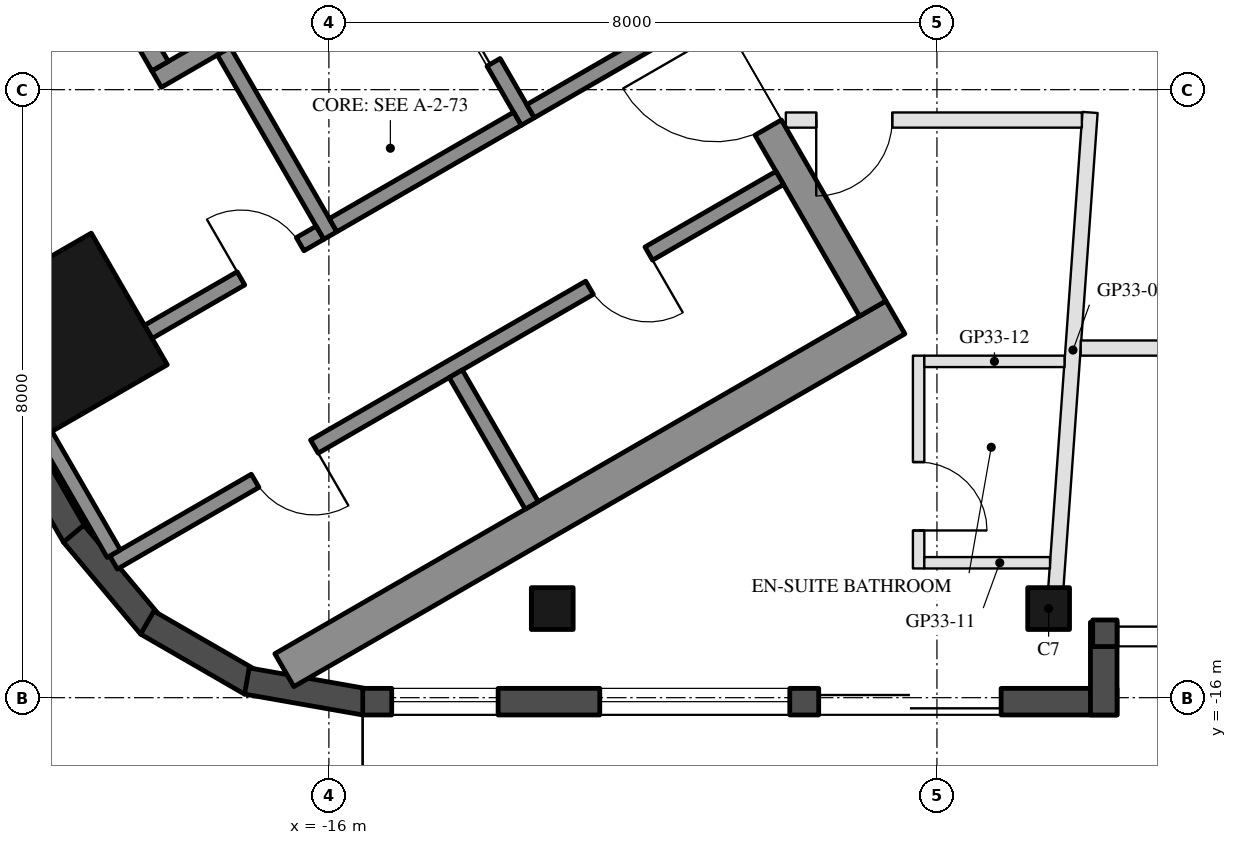
"""IFC4 building model, lengths in metres.
Left out: names, types, materials, properties, quantities, classifications, styles, units other than length and angle.
Written with IfcOpenShell. Run it as: python <this file> out.ifc"""

import sys

from ifc_helpers import new_model, si_unit, direction, frame, frame_2d, origin, origin_2d, place, context, subcontext, project, spatial, rectangle, hollow_rectangle, extrude, boolean, halfspace, element, fill, save


model = new_model("IFC4")
c1 = context("Model", 3, precision=1e-05, world=origin(), true_north=direction((0.0, 1.0)))
c2 = subcontext(c1, "Body", "Model", "MODEL_VIEW")
j1 = project(units=[si_unit("LENGTHUNIT", "METRE"), si_unit("PLANEANGLEUNIT", "RADIAN")], contexts=[c1])
p1 = place(None, origin())
s1 = spatial("IfcSite", under=j1, at=p1, CompositionType="ELEMENT")
p2 = place(p1, origin())
s2 = spatial("IfcBuilding", under=s1, at=p2, CompositionType="ELEMENT")
p3 = place(p2, frame((0.0, 0.0, 313.3)))
s3 = spatial("IfcBuildingStorey", under=s2, at=p3, CompositionType="ELEMENT", Elevation=313.3)
p4 = place(p3, frame((-13.061, -14.827, 0.0), z_axis=(0.0, 0.0, 1.0), x_axis=(-1.0, 0.0, 0.0)))
e1 = element("IfcColumn", 1, at=p4, inside=s3, PredefinedType="COLUMN", context=c2, shape_type="SweptSolid", body=[
    boolean("DIFFERENCE", extrude(hollow_rectangle(XDim=0.55, YDim=0.55, WallThickness=0.025, at=origin_2d()), origin(), (0.0, 0.0, 1.0), 3.7), halfspace(frame((0.0, 0.0, 0.04), z_axis=(0.0, 0.0, 1.0), x_axis=(1.0, 0.0, 0.0)), True)),
])
p5 = place(p3, frame((-6.531, -14.827, 0.0), z_axis=(0.0, 0.0, 1.0), x_axis=(-1.0, 0.0, 0.0)))
e2 = element("IfcColumn", 2, at=p5, inside=s3, PredefinedType="COLUMN", context=c2, shape_type="SweptSolid", body=[
    boolean("DIFFERENCE", extrude(hollow_rectangle(XDim=0.55, YDim=0.55, WallThickness=0.025, at=origin_2d()), origin(), (0.0, 0.0, 1.0), 3.7), halfspace(frame((0.0, 0.0, 0.034), z_axis=(0.0, 0.0, 1.0), x_axis=(1.0, 0.0, 0.0)), True)),
])
p6 = place(p3, frame((-19.492, -11.254, 0.0), z_axis=(0.0, 0.0, 1.0), x_axis=(-0.5, 0.866025403784, 0.0)))
e3 = element("IfcColumn", 3, at=p6, inside=s3, PredefinedType="COLUMN", context=c2, shape_type="SweptSolid", body=[
    boolean("DIFFERENCE", extrude(hollow_rectangle(XDim=2.0, YDim=2.0, WallThickness=0.05, at=origin_2d()), origin(), (0.0, 0.0, 1.0), 3.7), halfspace(frame((0.0, 0.0, 0.113), z_axis=(0.0, 0.0, 1.0), x_axis=(1.0, 0.0, 0.0)), True)),
])
p7 = place(p3, frame((-21.679, -9.816, 0.0), z_axis=(0.0, 0.0, 1.0), x_axis=(0.500023656998, -0.86601174498, 0.0)))
e4 = element("IfcWall", 4, at=p7, inside=s3, PredefinedType="SOLIDWALL", context=c2, shape_type="SweptSolid", body=[
    extrude(rectangle(XDim=4.677, YDim=0.35, at=frame_2d((2.339, 0.0))), origin(), (0.0, 0.0, 1.0), 3.55),
])
for number, where, z_axis, x_axis in (
    (5, (-19.358, -13.842, 0.0), (0.0, 0.0, 1.0), (0.643, -0.766, 0.0)),
    (6, (-18.389, -15.012, 0.0), (0.0, 0.0, 1.0), (0.866, -0.5, 0.0)),
    (7, (-17.079, -15.781, 0.0), (0.0, 0.0, 1.0), (0.985, -0.174, 0.0)),
):
    element("IfcWall", number, at=place(p3, frame(where, z_axis=z_axis, x_axis=x_axis)), inside=s3, PredefinedType="SOLIDWALL", context=c2, shape_type="SweptSolid", body=[
        extrude(rectangle(XDim=1.579, YDim=0.35, at=frame_2d((0.79, 0.0))), origin(), (0.0, 0.0, 1.0), 3.55),
    ])
p8 = place(p3, frame((-15.554, -16.052, 0.0), z_axis=(0.0, 0.0, 1.0), x_axis=(1.0, 0.0, 0.0)))
e8 = element("IfcWall", 8, at=p8, inside=s3, PredefinedType="SOLIDWALL", context=c2, shape_type="SweptSolid", body=[
    extrude(rectangle(XDim=9.924, YDim=0.35, at=frame_2d((4.962, 0.0))), origin(), (0.0, 0.0, 1.0), 3.55),
])
p9 = place(p8, frame((0.381, 0.0, 0.3)))
e9 = element("IfcOpeningElement", 9, at=p9, cuts=e8, PredefinedType="OPENING", context=c2, shape_type="SweptSolid", body=[
    extrude(rectangle(XDim=1.4, YDim=2.65, at=frame_2d((0.7, 1.325))), frame((0.0, 0.185, 0.0), z_axis=(0.0, -1.0, 0.0), x_axis=(1.0, 0.0, 0.0)), (0.0, 0.0, 1.0), 0.37),
])
p10 = place(p8, frame((5.999, 0.0, 0.0)))
e10 = element("IfcOpeningElement", 10, at=p10, cuts=e8, PredefinedType="OPENING", context=c2, shape_type="SweptSolid", body=[
    extrude(rectangle(XDim=2.4, YDim=2.4, at=frame_2d((1.2, 1.2))), frame((0.0, 0.185, 0.0), z_axis=(0.0, -1.0, 0.0), x_axis=(1.0, 0.0, 0.0)), (0.0, 0.0, 1.0), 0.37),
])
p11 = place(p8, frame((3.118, 0.0, 0.3)))
e11 = element("IfcOpeningElement", 11, at=p11, cuts=e8, PredefinedType="OPENING", context=c2, shape_type="SweptSolid", body=[
    extrude(rectangle(XDim=2.5, YDim=2.65, at=frame_2d((1.25, 1.325))), frame((0.0, 0.185, 0.0), z_axis=(0.0, -1.0, 0.0), x_axis=(1.0, 0.0, 0.0)), (0.0, 0.0, 1.0), 0.37),
])
p12 = place(p3, frame((-5.806, -16.228, 0.0), z_axis=(0.0, 0.0, 1.0), x_axis=(0.0, 1.0, 0.0)))
e12 = element("IfcWall", 12, at=p12, inside=s3, PredefinedType="SOLIDWALL", context=c2, shape_type="SweptSolid", body=[
    extrude(rectangle(XDim=1.22, YDim=0.35, at=frame_2d((0.61, 0.0))), origin(), (0.0, 0.0, 1.0), 3.55),
])
p13 = place(p3, frame((-5.951, -15.153, 0.0), z_axis=(0.0, 0.0, 1.0), x_axis=(1.0, 0.0, 0.0)))
e13 = element("IfcWall", 13, at=p13, inside=s3, PredefinedType="SOLIDWALL", context=c2, shape_type="SweptSolid", body=[
    extrude(rectangle(XDim=5.371, YDim=0.35, at=frame_2d((2.685, 0.0))), origin(), (0.0, 0.0, 1.0), 3.55),
])
p14 = place(p13, frame((0.32, 0.0, 0.0)))
e14 = element("IfcOpeningElement", 14, at=p14, cuts=e13, PredefinedType="OPENING", context=c2, shape_type="SweptSolid", body=[
    extrude(rectangle(XDim=2.4, YDim=2.4, at=frame_2d((1.2, 1.2))), frame((0.0, 0.185, 0.0), z_axis=(0.0, -1.0, 0.0), x_axis=(1.0, 0.0, 0.0)), (0.0, 0.0, 1.0), 0.37),
])
p15 = place(p13, frame((3.02, 0.0, 0.3)))
e15 = element("IfcOpeningElement", 15, at=p15, cuts=e13, PredefinedType="OPENING", context=c2, shape_type="SweptSolid", body=[
    extrude(rectangle(XDim=1.5, YDim=2.65, at=frame_2d((0.75, 1.325))), frame((0.0, 0.185, 0.0), z_axis=(0.0, -1.0, 0.0), x_axis=(1.0, 0.0, 0.0)), (0.0, 0.0, 1.0), 0.37),
])
p16 = place(p3, frame((-8.547, -10.997, 0.0), z_axis=(0.0, 0.0, 1.0), x_axis=(-0.866025286072, -0.500000203884, 0.0)))
e16 = element("IfcWall", 16, at=p16, inside=s3, PredefinedType="SHEAR", context=c2, shape_type="SweptSolid", body=[
    extrude(rectangle(XDim=9.283, YDim=0.5, at=frame_2d((4.641, 0.0))), origin(), (0.0, 0.0, 1.0), 3.5),
])
p17 = place(p3, frame((-13.845, -2.22, 0.0), z_axis=(0.0, 0.0, 1.0), x_axis=(0.500004234368, -0.866022959057, 0.0)))
e17 = element("IfcWall", 17, at=p17, inside=s3, PredefinedType="SHEAR", context=c2, shape_type="SweptSolid", body=[
    extrude(rectangle(XDim=10.0, YDim=0.4, at=frame_2d((5.0, 0.0))), origin(), (0.0, 0.0, 1.0), 3.5),
])
p18 = place(p17, frame((3.55, 0.0, 0.0)))
e18 = element("IfcOpeningElement", 18, at=p18, cuts=e17, PredefinedType="OPENING", context=c2, shape_type="SweptSolid", body=[
    extrude(rectangle(XDim=1.1, YDim=2.1, at=frame_2d((0.55, 1.05))), frame((0.0, 0.21, 0.0), z_axis=(0.0, -1.0, 0.0), x_axis=(1.0, 0.0, 0.0)), (0.0, 0.0, 1.0), 0.42),
])
p19 = place(p17, frame((5.85, 0.0, 0.0)))
e19 = element("IfcOpeningElement", 19, at=p19, cuts=e17, PredefinedType="OPENING", context=c2, shape_type="SweptSolid", body=[
    extrude(rectangle(XDim=1.4, YDim=2.1, at=frame_2d((0.7, 1.05))), frame((0.0, 0.21, 0.0), z_axis=(0.0, -1.0, 0.0), x_axis=(1.0, 0.0, 0.0)), (0.0, 0.0, 1.0), 0.42),
])
p20 = place(p3, frame((-12.681, -4.636, 0.0), z_axis=(0.0, 0.0, 1.0), x_axis=(-0.866021702275, -0.500006411147, 0.0)))
e20 = element("IfcWall", 20, at=p20, inside=s3, PredefinedType="SHEAR", context=c2, shape_type="SweptSolid", body=[
    extrude(rectangle(XDim=6.45, YDim=0.25, at=frame_2d((3.225, 0.0))), origin(), (0.0, 0.0, 1.0), 3.5),
])
p21 = place(p20, frame((0.3, 0.0, 0.0)))
e21 = element("IfcOpeningElement", 21, at=p21, cuts=e20, PredefinedType="OPENING", context=c2, shape_type="SweptSolid", body=[
    extrude(rectangle(XDim=1.0, YDim=2.1, at=frame_2d((0.5, 1.05))), frame((0.0, 0.135, 0.0), z_axis=(0.0, -1.0, 0.0), x_axis=(1.0, 0.0, 0.0)), (0.0, 0.0, 1.0), 0.27),
])
p22 = place(p3, frame((-19.496, -5.482, 0.0), z_axis=(0.0, 0.0, 1.0), x_axis=(0.499990435942, -0.866030925526, 0.0)))
e22 = element("IfcWall", 22, at=p22, inside=s3, PredefinedType="SHEAR", context=c2, shape_type="SweptSolid", body=[
    extrude(rectangle(XDim=2.55, YDim=0.25, at=frame_2d((1.275, 0.0))), origin(), (0.0, 0.0, 1.0), 3.5),
])
p23 = place(p3, frame((-17.381, -7.495, 0.0), z_axis=(0.0, 0.0, 1.0), x_axis=(0.500011755427, -0.866018616679, 0.0)))
e23 = element("IfcWall", 23, at=p23, inside=s3, PredefinedType="SHEAR", context=c2, shape_type="SweptSolid", body=[
    extrude(rectangle(XDim=2.8, YDim=0.2, at=frame_2d((1.4, 0.0))), origin(), (0.0, 0.0, 1.0), 3.5),
])
p24 = place(p3, frame((-14.783, -5.995, 0.0), z_axis=(0.0, 0.0, 1.0), x_axis=(0.49994636267, -0.866056369097, 0.0)))
e24 = element("IfcWall", 24, at=p24, inside=s3, PredefinedType="SHEAR", context=c2, shape_type="SweptSolid", body=[
    extrude(rectangle(XDim=2.8, YDim=0.2, at=frame_2d((1.4, 0.0))), origin(), (0.0, 0.0, 1.0), 3.5),
])
p25 = place(p24, frame((0.7, 0.0, 0.0)))
e25 = element("IfcOpeningElement", 25, at=p25, cuts=e24, PredefinedType="OPENING", context=c2, shape_type="SweptSolid", body=[
    extrude(rectangle(XDim=1.2, YDim=2.1, at=frame_2d((0.6, 1.05))), frame((0.0, 0.11, 0.0), z_axis=(0.0, -1.0, 0.0), x_axis=(1.0, 0.0, 0.0)), (0.0, 0.0, 1.0), 0.22),
])
p26 = place(p3, frame((-13.52, -8.383, 0.0), z_axis=(0.0, 0.0, 1.0), x_axis=(-0.866034573852, -0.49998411664, 0.0)))
e26 = element("IfcWall", 26, at=p26, inside=s3, PredefinedType="SHEAR", context=c2, shape_type="SweptSolid", body=[
    extrude(rectangle(XDim=2.8, YDim=0.2, at=frame_2d((1.4, 0.0))), origin(), (0.0, 0.0, 1.0), 3.5),
])
p27 = place(p3, frame((-11.268, -7.083, 0.0), z_axis=(0.0, 0.0, 1.0), x_axis=(-0.866050077142, -0.499957262057, 0.0)))
e27 = element("IfcWall", 27, at=p27, inside=s3, PredefinedType="SHEAR", context=c2, shape_type="SweptSolid", body=[
    extrude(rectangle(XDim=2.4, YDim=0.2, at=frame_2d((1.2, 0.0))), origin(), (0.0, 0.0, 1.0), 3.5),
])
p28 = place(p3, frame((-10.068, -9.162, 0.0), z_axis=(0.0, 0.0, 1.0), x_axis=(-0.866030125237, -0.499991822116, 0.0)))
e28 = element("IfcWall", 28, at=p28, inside=s3, PredefinedType="SHEAR", context=c2, shape_type="SweptSolid", body=[
    extrude(rectangle(XDim=10.121, YDim=0.2, at=frame_2d((5.061, 0.0))), origin(), (0.0, 0.0, 1.0), 3.5),
])
p29 = place(p28, frame((1.99, 0.0, 0.0)))
e29 = element("IfcOpeningElement", 29, at=p29, cuts=e28, PredefinedType="OPENING", context=c2, shape_type="SweptSolid", body=[
    extrude(rectangle(XDim=0.9, YDim=2.1, at=frame_2d((0.45, 1.05))), frame((0.0, 0.11, 0.0), z_axis=(0.0, -1.0, 0.0), x_axis=(1.0, 0.0, 0.0)), (0.0, 0.0, 1.0), 0.22),
])
p30 = place(p28, frame((7.07, 0.0, 0.0)))
e30 = element("IfcOpeningElement", 30, at=p30, cuts=e28, PredefinedType="OPENING", context=c2, shape_type="SweptSolid", body=[
    extrude(rectangle(XDim=0.9, YDim=2.1, at=frame_2d((0.45, 1.05))), frame((0.0, 0.11, 0.0), z_axis=(0.0, -1.0, 0.0), x_axis=(1.0, 0.0, 0.0)), (0.0, 0.0, 1.0), 0.22),
])
p31 = place(p3, frame((-19.73, -12.546, 0.0), z_axis=(0.0, 0.0, 1.0), x_axis=(0.500004188491, -0.866022985545, 0.0)))
e31 = element("IfcWall", 31, at=p31, inside=s3, PredefinedType="SHEAR", context=c2, shape_type="SweptSolid", body=[
    extrude(rectangle(XDim=1.8, YDim=0.2, at=frame_2d((0.9, 0.0))), origin(), (0.0, 0.0, 1.0), 3.5),
])
p32 = place(p3, frame((-16.118, -9.883, 0.0), z_axis=(0.0, 0.0, 1.0), x_axis=(-0.866045268016, -0.499965592563, 0.0)))
e32 = element("IfcWall", 32, at=p32, inside=s3, PredefinedType="SHEAR", context=c2, shape_type="SweptSolid", body=[
    extrude(rectangle(XDim=2.608, YDim=0.2, at=frame_2d((1.304, 0.0))), origin(), (0.0, 0.0, 1.0), 3.5),
])
p33 = place(p32, frame((0.3, 0.0, 0.0)))
e33 = element("IfcOpeningElement", 33, at=p33, cuts=e32, PredefinedType="OPENING", context=c2, shape_type="SweptSolid", body=[
    extrude(rectangle(XDim=0.9, YDim=2.1, at=frame_2d((0.45, 1.05))), frame((0.0, 0.11, 0.0), z_axis=(0.0, -1.0, 0.0), x_axis=(1.0, 0.0, 0.0)), (0.0, 0.0, 1.0), 0.22),
])
p34 = place(p3, frame((-14.331, -11.738, 0.0), z_axis=(0.0, 0.0, 1.0), x_axis=(0.499972520799, -0.866041268327, 0.0)))
e34 = element("IfcWall", 34, at=p34, inside=s3, PredefinedType="SHEAR", context=c2, shape_type="SweptSolid", body=[
    extrude(rectangle(XDim=2.0, YDim=0.2, at=frame_2d((1.0, 0.0))), origin(), (0.0, 0.0, 1.0), 3.5),
])
p35 = place(p3, frame((-6.435, -14.552, 0.0), z_axis=(0.0, 0.0, 1.0), x_axis=(0.071739706377, 0.997423387799, 0.0)))
e35 = element("IfcWall", 35, at=p35, inside=s3, PredefinedType="PARTITIONING", context=c2, shape_type="SweptSolid", body=[
    extrude(rectangle(XDim=6.269, YDim=0.2, at=frame_2d((3.134, 0.0))), origin(), (0.0, 0.0, 1.0), 3.1),
])
p36 = place(p3, frame((-6.093, -8.4, 0.0), z_axis=(0.0, 0.0, 1.0), x_axis=(-1.0, 0.0, 0.0)))
e36 = element("IfcWall", 36, at=p36, inside=s3, PredefinedType="PARTITIONING", context=c2, shape_type="SweptSolid", body=[
    extrude(rectangle(XDim=3.895, YDim=0.2, at=frame_2d((1.948, 0.0))), origin(), (0.0, 0.0, 1.0), 3.1),
])
p37 = place(p36, frame((2.495, 0.0, 0.0)))
e37 = element("IfcOpeningElement", 37, at=p37, cuts=e36, PredefinedType="OPENING", context=c2, shape_type="SweptSolid", body=[
    extrude(rectangle(XDim=1.0, YDim=2.1, at=frame_2d((0.5, 1.05))), frame((0.0, 0.11, 0.0), z_axis=(0.0, -1.0, 0.0), x_axis=(1.0, 0.0, 0.0)), (0.0, 0.0, 1.0), 0.22),
])
p38 = place(p3, frame((-8.241, -11.5, 0.0), z_axis=(0.0, 0.0, 1.0), x_axis=(0.0, -1.0, 0.0)))
e38 = element("IfcWall", 38, at=p38, inside=s3, PredefinedType="PARTITIONING", context=c2, shape_type="SweptSolid", body=[
    extrude(rectangle(XDim=2.8, YDim=0.15, at=frame_2d((1.4, 0.0))), origin(), (0.0, 0.0, 1.0), 3.55),
])
p39 = place(p38, frame((1.4, 0.0, 0.0)))
e39 = element("IfcOpeningElement", 39, at=p39, cuts=e38, PredefinedType="OPENING", context=c2, shape_type="SweptSolid", body=[
    extrude(rectangle(XDim=0.9, YDim=2.1, at=frame_2d((0.45, 1.05))), frame((0.0, 0.085, 0.0), z_axis=(0.0, -1.0, 0.0), x_axis=(1.0, 0.0, 0.0)), (0.0, 0.0, 1.0), 0.17),
])
p40 = place(p3, frame((-8.166, -14.225, 0.0), z_axis=(0.0, 0.0, 1.0), x_axis=(1.0, 0.0, 0.0)))
e40 = element("IfcWall", 40, at=p40, inside=s3, PredefinedType="PARTITIONING", context=c2, shape_type="SweptSolid", body=[
    extrude(rectangle(XDim=1.654, YDim=0.15, at=frame_2d((0.827, 0.0))), origin(), (0.0, 0.0, 1.0), 3.1),
])
p41 = place(p3, frame((-8.166, -11.575, 0.0), z_axis=(0.0, 0.0, 1.0), x_axis=(1.0, 0.0, 0.0)))
e41 = element("IfcWall", 41, at=p41, inside=s3, PredefinedType="PARTITIONING", context=c2, shape_type="SweptSolid", body=[
    extrude(rectangle(XDim=1.845, YDim=0.15, at=frame_2d((0.922, 0.0))), origin(), (0.0, 0.0, 1.0), 3.1),
])
p42 = place(p3, frame((0.571, -11.4, 0.0), z_axis=(0.0, 0.0, 1.0), x_axis=(-1.0, 0.0, 0.0)))
e42 = element("IfcWall", 42, at=p42, inside=s3, PredefinedType="PARTITIONING", context=c2, shape_type="SweptSolid", body=[
    extrude(rectangle(XDim=6.679, YDim=0.2, at=frame_2d((3.34, 0.0))), origin(), (0.0, 0.0, 1.0), 3.1),
])
p43 = place(p42, frame((2.84, 0.0, 0.0)))
e43 = element("IfcOpeningElement", 43, at=p43, cuts=e42, PredefinedType="OPENING", context=c2, shape_type="SweptSolid", body=[
    extrude(rectangle(XDim=1.0, YDim=2.1, at=frame_2d((0.5, 1.05))), frame((0.0, 0.11, 0.0), z_axis=(0.0, -1.0, 0.0), x_axis=(1.0, 0.0, 0.0)), (0.0, 0.0, 1.0), 0.22),
])
p44 = place(p9, origin())
e44 = element("IfcWindow", 44, at=p44, inside=s3, PartitioningType="SINGLE_PANEL", PredefinedType="WINDOW", context=c2, shape_type="SweptSolid", body=[
    extrude(rectangle(XDim=1.4, YDim=2.65, at=frame_2d((0.7, 1.325))), frame((0.0, 0.03, 0.0), z_axis=(0.0, -1.0, 0.0), x_axis=(1.0, 0.0, 0.0)), (0.0, 0.0, 1.0), 0.06),
])
fill(e9, e44)
p45 = place(p10, frame((2.4, 0.0, 0.0), z_axis=(0.0, 0.0, 1.0), x_axis=(-1.0, 0.0, 0.0)))
e45 = element("IfcDoor", 45, at=p45, inside=s3, OperationType="SLIDING_TO_LEFT", PredefinedType="DOOR", context=c2, shape_type="SweptSolid", body=[
    extrude(rectangle(XDim=2.4, YDim=2.4, at=frame_2d((1.2, 1.2))), frame((0.0, 0.025, 0.0), z_axis=(0.0, -1.0, 0.0), x_axis=(1.0, 0.0, 0.0)), (0.0, 0.0, 1.0), 0.05),
])
fill(e10, e45)
p46 = place(p11, origin())
e46 = element("IfcWindow", 46, at=p46, inside=s3, PartitioningType="SINGLE_PANEL", PredefinedType="WINDOW", context=c2, shape_type="SweptSolid", body=[
    extrude(rectangle(XDim=2.5, YDim=2.65, at=frame_2d((1.25, 1.325))), frame((0.0, 0.03, 0.0), z_axis=(0.0, -1.0, 0.0), x_axis=(1.0, 0.0, 0.0)), (0.0, 0.0, 1.0), 0.06),
])
fill(e11, e46)
p47 = place(p14, frame((2.4, 0.0, 0.0), z_axis=(0.0, 0.0, 1.0), x_axis=(-1.0, 0.0, 0.0)))
e47 = element("IfcDoor", 47, at=p47, inside=s3, OperationType="SLIDING_TO_LEFT", PredefinedType="DOOR", context=c2, shape_type="SweptSolid", body=[
    extrude(rectangle(XDim=2.4, YDim=2.4, at=frame_2d((1.2, 1.2))), frame((0.0, 0.025, 0.0), z_axis=(0.0, -1.0, 0.0), x_axis=(1.0, 0.0, 0.0)), (0.0, 0.0, 1.0), 0.05),
])
fill(e14, e47)
p48 = place(p25, origin())
e48 = element("IfcDoor", 48, at=p48, inside=s3, OperationType="DOUBLE_DOOR_SLIDING", PredefinedType="DOOR", context=c2, shape_type="SweptSolid", body=[
    extrude(rectangle(XDim=1.2, YDim=2.1, at=frame_2d((0.6, 1.05))), frame((0.0, 0.025, 0.0), z_axis=(0.0, -1.0, 0.0), x_axis=(1.0, 0.0, 0.0)), (0.0, 0.0, 1.0), 0.05),
])
fill(e25, e48)
p49 = place(p29, origin())
e49 = element("IfcDoor", 49, at=p49, inside=s3, OperationType="SINGLE_SWING_LEFT", PredefinedType="DOOR", context=c2, shape_type="SweptSolid", body=[
    extrude(rectangle(XDim=0.9, YDim=2.1, at=frame_2d((0.45, 1.05))), frame((0.0, 0.025, 0.0), z_axis=(0.0, -1.0, 0.0), x_axis=(1.0, 0.0, 0.0)), (0.0, 0.0, 1.0), 0.05),
])
fill(e29, e49)
p50 = place(p30, origin())
e50 = element("IfcDoor", 50, at=p50, inside=s3, OperationType="SINGLE_SWING_LEFT", PredefinedType="DOOR", context=c2, shape_type="SweptSolid", body=[
    extrude(rectangle(XDim=0.9, YDim=2.1, at=frame_2d((0.45, 1.05))), frame((0.0, 0.025, 0.0), z_axis=(0.0, -1.0, 0.0), x_axis=(1.0, 0.0, 0.0)), (0.0, 0.0, 1.0), 0.05),
])
fill(e30, e50)
p51 = place(p33, frame((0.9, 0.0, 0.0), z_axis=(0.0, 0.0, 1.0), x_axis=(-1.0, 0.0, 0.0)))
e51 = element("IfcDoor", 51, at=p51, inside=s3, OperationType="SINGLE_SWING_LEFT", PredefinedType="DOOR", context=c2, shape_type="SweptSolid", body=[
    extrude(rectangle(XDim=0.9, YDim=2.1, at=frame_2d((0.45, 1.05))), frame((0.0, 0.025, 0.0), z_axis=(0.0, -1.0, 0.0), x_axis=(1.0, 0.0, 0.0)), (0.0, 0.0, 1.0), 0.05),
])
fill(e33, e51)
p52 = place(p19, frame((1.4, 0.0, 0.0), z_axis=(0.0, 0.0, 1.0), x_axis=(-1.0, 0.0, 0.0)))
e52 = element("IfcDoor", 52, at=p52, inside=s3, OperationType="DOUBLE_DOOR_SINGLE_SWING", PredefinedType="DOOR", context=c2, shape_type="SweptSolid", body=[
    extrude(rectangle(XDim=1.4, YDim=2.1, at=frame_2d((0.7, 1.05))), frame((0.0, 0.025, 0.0), z_axis=(0.0, -1.0, 0.0), x_axis=(1.0, 0.0, 0.0)), (0.0, 0.0, 1.0), 0.05),
])
fill(e19, e52)
p53 = place(p39, origin())
e53 = element("IfcDoor", 53, at=p53, inside=s3, OperationType="SINGLE_SWING_RIGHT", PredefinedType="DOOR", context=c2, shape_type="SweptSolid", body=[
    extrude(rectangle(XDim=0.9, YDim=2.1, at=frame_2d((0.45, 1.05))), frame((0.0, 0.025, 0.0), z_axis=(0.0, -1.0, 0.0), x_axis=(1.0, 0.0, 0.0)), (0.0, 0.0, 1.0), 0.05),
])
fill(e39, e53)
p54 = place(p37, origin())
e54 = element("IfcDoor", 54, at=p54, inside=s3, OperationType="SINGLE_SWING_RIGHT", PredefinedType="DOOR", context=c2, shape_type="SweptSolid", body=[
    extrude(rectangle(XDim=1.0, YDim=2.1, at=frame_2d((0.5, 1.05))), frame((0.0, 0.025, 0.0), z_axis=(0.0, -1.0, 0.0), x_axis=(1.0, 0.0, 0.0)), (0.0, 0.0, 1.0), 0.05),
])
fill(e37, e54)
save(model, sys.argv[1])
